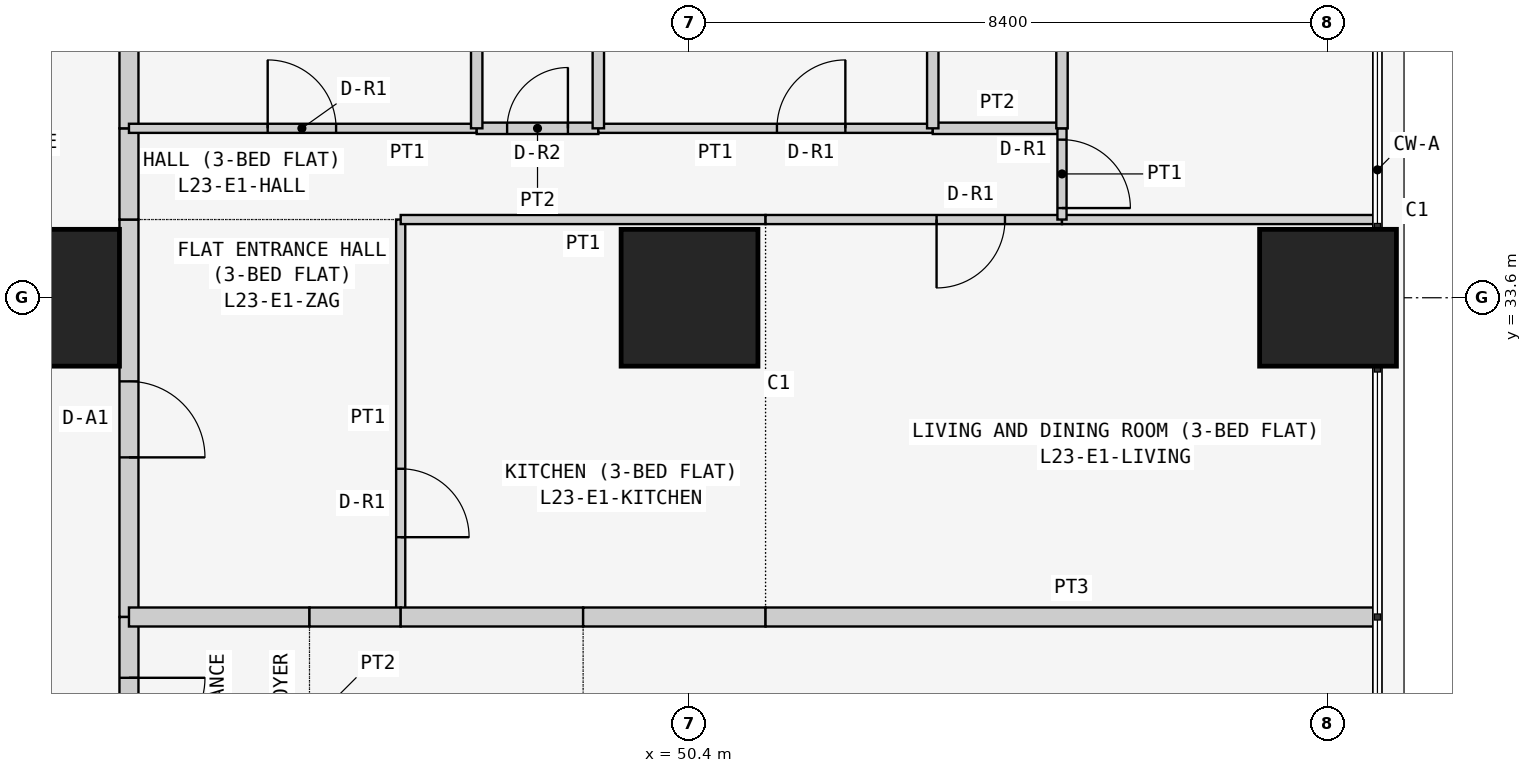
"""IFC4 building model, lengths in metres.
Left out: names, types, materials, properties, quantities, classifications, styles, units other than length and angle.
Written with IfcOpenShell. Run it as: python <this file> out.ifc"""

import sys

from ifc_helpers import new_model, si_unit, direction, frame, frame_2d, origin, origin_2d, place, context, subcontext, project, spatial, rectangle, extrude, element, fill, save


model = new_model("IFC4")
c1 = context("Model", 3, precision=1e-05, world=origin(), true_north=direction((0.0, 1.0)))
c2 = subcontext(c1, "Body", "Model", "MODEL_VIEW")
j1 = project(units=[si_unit("LENGTHUNIT", "METRE"), si_unit("PLANEANGLEUNIT", "RADIAN")], contexts=[c1])
p1 = place(None, origin())
s1 = spatial("IfcSite", under=j1, at=p1, CompositionType="ELEMENT")
p2 = place(p1, origin())
s2 = spatial("IfcBuilding", under=s1, at=p2, CompositionType="ELEMENT")
p3 = place(p2, frame((0.0, 0.0, 92.1)))
s3 = spatial("IfcBuildingStorey", under=s2, at=p3, CompositionType="ELEMENT", Elevation=92.1)
for number, where, z_axis, x_axis in (
    (1, (42.0, 33.6, 0.0), (0.0, 0.0, 1.0), (1.0, 0.0, 0.0)),
    (2, (50.4, 33.6, 0.0), (0.0, 0.0, 1.0), (1.0, 0.0, 0.0)),
    (3, (58.8, 33.6, 0.0), (0.0, 0.0, 1.0), (1.0, 0.0, 0.0)),
):
    element("IfcColumn", number, at=place(p3, frame(where, z_axis=z_axis, x_axis=x_axis)), inside=s3, PredefinedType="COLUMN", context=c2, shape_type="SweptSolid", body=[
        extrude(rectangle(XDim=1.8, YDim=1.8, at=origin_2d()), origin(), (0.0, 0.0, 1.0), 3.6),
    ])
p4 = place(p3, frame((43.025, 34.629, 0.0), z_axis=(0.0, 0.0, 1.0), x_axis=(0.0, -1.0, 0.0)))
e4 = element("IfcWall", 4, at=p4, inside=s3, PredefinedType="PARTITIONING", context=c2, shape_type="SweptSolid", body=[
    extrude(rectangle(XDim=5.229, YDim=0.25, at=frame_2d((2.615, 0.0))), origin(), (0.0, 0.0, 1.0), 3.45),
])
p5 = place(p4, frame((2.129, 0.0, 0.0)))
e5 = element("IfcOpeningElement", 5, at=p5, cuts=e4, PredefinedType="OPENING", context=c2, shape_type="SweptSolid", body=[
    extrude(rectangle(XDim=1.0, YDim=2.1, at=frame_2d((0.5, 1.05))), frame((0.0, 0.135, 0.0), z_axis=(0.0, -1.0, 0.0), x_axis=(1.0, 0.0, 0.0)), (0.0, 0.0, 1.0), 0.27),
])
p6 = place(p3, frame((43.025, 35.829, 0.0), z_axis=(0.0, 0.0, 1.0), x_axis=(0.0, -1.0, 0.0)))
e6 = element("IfcWall", 6, at=p6, inside=s3, PredefinedType="PARTITIONING", context=c2, shape_type="SweptSolid", body=[
    extrude(rectangle(XDim=1.2, YDim=0.25, at=frame_2d((0.6, 0.0))), origin(), (0.0, 0.0, 1.0), 3.45),
])
p7 = place(p3, frame((43.025, 42.7, 0.0), z_axis=(0.0, 0.0, 1.0), x_axis=(0.0, -1.0, 0.0)))
e7 = element("IfcWall", 7, at=p7, inside=s3, PredefinedType="PARTITIONING", context=c2, shape_type="SweptSolid", body=[
    extrude(rectangle(XDim=6.871, YDim=0.25, at=frame_2d((3.436, 0.0))), origin(), (0.0, 0.0, 1.0), 3.45),
])
p8 = place(p3, frame((43.025, 29.4, 0.0), z_axis=(0.0, 0.0, 1.0), x_axis=(0.0, -1.0, 0.0)))
e8 = element("IfcWall", 8, at=p8, inside=s3, PredefinedType="PARTITIONING", context=c2, shape_type="SweptSolid", body=[
    extrude(rectangle(XDim=2.6, YDim=0.25, at=frame_2d((1.3, 0.0))), origin(), (0.0, 0.0, 1.0), 3.45),
])
p9 = place(p8, frame((0.8, 0.0, 0.0)))
e9 = element("IfcOpeningElement", 9, at=p9, cuts=e8, PredefinedType="OPENING", context=c2, shape_type="SweptSolid", body=[
    extrude(rectangle(XDim=1.0, YDim=2.1, at=frame_2d((0.5, 1.05))), frame((0.0, 0.135, 0.0), z_axis=(0.0, -1.0, 0.0), x_axis=(1.0, 0.0, 0.0)), (0.0, 0.0, 1.0), 0.27),
])
p10 = place(p3, frame((46.6, 29.4, 0.0), z_axis=(0.0, 0.0, 1.0), x_axis=(0.0, 1.0, 0.0)))
e10 = element("IfcWall", 10, at=p10, inside=s3, PredefinedType="PARTITIONING", context=c2, shape_type="SweptSolid", body=[
    extrude(rectangle(XDim=5.229, YDim=0.12, at=frame_2d((2.615, 0.0))), origin(), (0.0, 0.0, 1.0), 3.45),
])
p11 = place(p10, frame((1.05, 0.0, 0.0)))
e11 = element("IfcOpeningElement", 11, at=p11, cuts=e10, PredefinedType="OPENING", context=c2, shape_type="SweptSolid", body=[
    extrude(rectangle(XDim=0.9, YDim=2.1, at=frame_2d((0.45, 1.05))), frame((0.0, 0.07, 0.0), z_axis=(0.0, -1.0, 0.0), x_axis=(1.0, 0.0, 0.0)), (0.0, 0.0, 1.0), 0.14),
])
p12 = place(p3, frame((43.025, 29.4, 0.0), z_axis=(0.0, 0.0, 1.0), x_axis=(1.0, 0.0, 0.0)))
e12 = element("IfcWall", 12, at=p12, inside=s3, PredefinedType="PARTITIONING", context=c2, shape_type="SweptSolid", body=[
    extrude(rectangle(XDim=2.375, YDim=0.25, at=frame_2d((1.188, 0.0))), origin(), (0.0, 0.0, 1.0), 3.45),
])
p13 = place(p3, frame((45.4, 29.4, 0.0), z_axis=(0.0, 0.0, 1.0), x_axis=(1.0, 0.0, 0.0)))
e13 = element("IfcWall", 13, at=p13, inside=s3, PredefinedType="PARTITIONING", context=c2, shape_type="SweptSolid", body=[
    extrude(rectangle(XDim=1.2, YDim=0.25, at=frame_2d((0.6, 0.0))), origin(), (0.0, 0.0, 1.0), 3.45),
])
p14 = place(p3, frame((51.4, 34.629, 0.0), z_axis=(0.0, 0.0, 1.0), x_axis=(-1.0, 0.0, 0.0)))
e14 = element("IfcWall", 14, at=p14, inside=s3, PredefinedType="PARTITIONING", context=c2, shape_type="SweptSolid", body=[
    extrude(rectangle(XDim=4.8, YDim=0.12, at=frame_2d((2.4, 0.0))), origin(), (0.0, 0.0, 1.0), 3.45),
])
for number, where, z_axis, x_axis in (
    (15, (46.6, 29.4, 0.0), (0.0, 0.0, 1.0), (1.0, 0.0, 0.0)),
    (16, (49.0, 29.4, 0.0), (0.0, 0.0, 1.0), (1.0, 0.0, 0.0)),
):
    element("IfcWall", number, at=place(p3, frame(where, z_axis=z_axis, x_axis=x_axis)), inside=s3, PredefinedType="PARTITIONING", context=c2, shape_type="SweptSolid", body=[
        extrude(rectangle(XDim=2.4, YDim=0.25, at=frame_2d((1.2, 0.0))), origin(), (0.0, 0.0, 1.0), 3.45),
    ])
p15 = place(p3, frame((55.3, 34.629, 0.0), z_axis=(0.0, 0.0, 1.0), x_axis=(-1.0, 0.0, 0.0)))
e17 = element("IfcWall", 17, at=p15, inside=s3, PredefinedType="PARTITIONING", context=c2, shape_type="SweptSolid", body=[
    extrude(rectangle(XDim=3.9, YDim=0.12, at=frame_2d((1.95, 0.0))), origin(), (0.0, 0.0, 1.0), 3.45),
])
p16 = place(p15, frame((0.75, 0.0, 0.0)))
e18 = element("IfcOpeningElement", 18, at=p16, cuts=e17, PredefinedType="OPENING", context=c2, shape_type="SweptSolid", body=[
    extrude(rectangle(XDim=0.9, YDim=2.1, at=frame_2d((0.45, 1.05))), frame((0.0, 0.07, 0.0), z_axis=(0.0, -1.0, 0.0), x_axis=(1.0, 0.0, 0.0)), (0.0, 0.0, 1.0), 0.14),
])
p17 = place(p3, frame((59.45, 34.629, 0.0), z_axis=(0.0, 0.0, 1.0), x_axis=(-1.0, 0.0, 0.0)))
e19 = element("IfcWall", 19, at=p17, inside=s3, PredefinedType="PARTITIONING", context=c2, shape_type="SweptSolid", body=[
    extrude(rectangle(XDim=4.15, YDim=0.12, at=frame_2d((2.075, 0.0))), origin(), (0.0, 0.0, 1.0), 3.45),
])
p18 = place(p3, frame((51.4, 29.4, 0.0), z_axis=(0.0, 0.0, 1.0), x_axis=(1.0, 0.0, 0.0)))
e20 = element("IfcWall", 20, at=p18, inside=s3, PredefinedType="PARTITIONING", context=c2, shape_type="SweptSolid", body=[
    extrude(rectangle(XDim=8.05, YDim=0.25, at=frame_2d((4.025, 0.0))), origin(), (0.0, 0.0, 1.0), 3.45),
])
p19 = place(p3, frame((47.6, 35.829, 0.0), z_axis=(0.0, 0.0, 1.0), x_axis=(-1.0, 0.0, 0.0)))
e21 = element("IfcWall", 21, at=p19, inside=s3, PredefinedType="PARTITIONING", context=c2, shape_type="SweptSolid", body=[
    extrude(rectangle(XDim=4.575, YDim=0.12, at=frame_2d((2.288, 0.0))), origin(), (0.0, 0.0, 1.0), 3.45),
])
p20 = place(p19, frame((1.85, 0.0, 0.0)))
e22 = element("IfcOpeningElement", 22, at=p20, cuts=e21, PredefinedType="OPENING", context=c2, shape_type="SweptSolid", body=[
    extrude(rectangle(XDim=0.9, YDim=2.1, at=frame_2d((0.45, 1.05))), frame((0.0, 0.07, 0.0), z_axis=(0.0, -1.0, 0.0), x_axis=(1.0, 0.0, 0.0)), (0.0, 0.0, 1.0), 0.14),
])
p21 = place(p3, frame((49.2, 35.829, 0.0), z_axis=(0.0, 0.0, 1.0), x_axis=(-1.0, 0.0, 0.0)))
e23 = element("IfcWall", 23, at=p21, inside=s3, PredefinedType="PARTITIONING", context=c2, shape_type="SweptSolid", body=[
    extrude(rectangle(XDim=1.6, YDim=0.15, at=frame_2d((0.8, 0.0))), origin(), (0.0, 0.0, 1.0), 3.45),
])
p22 = place(p21, frame((0.4, 0.0, 0.0)))
e24 = element("IfcOpeningElement", 24, at=p22, cuts=e23, PredefinedType="OPENING", context=c2, shape_type="SweptSolid", body=[
    extrude(rectangle(XDim=0.8, YDim=2.1, at=frame_2d((0.4, 1.05))), frame((0.0, 0.085, 0.0), z_axis=(0.0, -1.0, 0.0), x_axis=(1.0, 0.0, 0.0)), (0.0, 0.0, 1.0), 0.17),
])
p23 = place(p3, frame((53.6, 35.829, 0.0), z_axis=(0.0, 0.0, 1.0), x_axis=(-1.0, 0.0, 0.0)))
e25 = element("IfcWall", 25, at=p23, inside=s3, PredefinedType="PARTITIONING", context=c2, shape_type="SweptSolid", body=[
    extrude(rectangle(XDim=4.4, YDim=0.12, at=frame_2d((2.2, 0.0))), origin(), (0.0, 0.0, 1.0), 3.45),
])
p24 = place(p23, frame((1.15, 0.0, 0.0)))
e26 = element("IfcOpeningElement", 26, at=p24, cuts=e25, PredefinedType="OPENING", context=c2, shape_type="SweptSolid", body=[
    extrude(rectangle(XDim=0.9, YDim=2.1, at=frame_2d((0.45, 1.05))), frame((0.0, 0.07, 0.0), z_axis=(0.0, -1.0, 0.0), x_axis=(1.0, 0.0, 0.0)), (0.0, 0.0, 1.0), 0.14),
])
p25 = place(p3, frame((55.3, 35.829, 0.0), z_axis=(0.0, 0.0, 1.0), x_axis=(-1.0, 0.0, 0.0)))
e27 = element("IfcWall", 27, at=p25, inside=s3, PredefinedType="PARTITIONING", context=c2, shape_type="SweptSolid", body=[
    extrude(rectangle(XDim=1.7, YDim=0.15, at=frame_2d((0.85, 0.0))), origin(), (0.0, 0.0, 1.0), 3.45),
])
p26 = place(p3, frame((55.3, 34.629, 0.0), z_axis=(0.0, 0.0, 1.0), x_axis=(0.0, 1.0, 0.0)))
e28 = element("IfcWall", 28, at=p26, inside=s3, PredefinedType="PARTITIONING", context=c2, shape_type="SweptSolid", body=[
    extrude(rectangle(XDim=1.2, YDim=0.12, at=frame_2d((0.6, 0.0))), origin(), (0.0, 0.0, 1.0), 3.45),
])
p27 = place(p26, frame((0.151, 0.0, 0.0)))
e29 = element("IfcOpeningElement", 29, at=p27, cuts=e28, PredefinedType="OPENING", context=c2, shape_type="SweptSolid", body=[
    extrude(rectangle(XDim=0.9, YDim=2.1, at=frame_2d((0.45, 1.05))), frame((0.0, 0.07, 0.0), z_axis=(0.0, -1.0, 0.0), x_axis=(1.0, 0.0, 0.0)), (0.0, 0.0, 1.0), 0.14),
])
for number, where, z_axis, x_axis in (
    (30, (47.6, 35.829, 0.0), (0.0, 0.0, 1.0), (0.0, 1.0, 0.0)),
    (31, (49.2, 35.829, 0.0), (0.0, 0.0, 1.0), (0.0, 1.0, 0.0)),
    (32, (53.6, 35.829, 0.0), (0.0, 0.0, 1.0), (0.0, 1.0, 0.0)),
):
    element("IfcWall", number, at=place(p3, frame(where, z_axis=z_axis, x_axis=x_axis)), inside=s3, PredefinedType="PARTITIONING", context=c2, shape_type="SweptSolid", body=[
        extrude(rectangle(XDim=6.871, YDim=0.15, at=frame_2d((3.436, 0.0))), origin(), (0.0, 0.0, 1.0), 3.45),
    ])
p28 = place(p3, frame((55.3, 35.829, 0.0), z_axis=(0.0, 0.0, 1.0), x_axis=(0.0, 1.0, 0.0)))
e33 = element("IfcWall", 33, at=p28, inside=s3, PredefinedType="PARTITIONING", context=c2, shape_type="SweptSolid", body=[
    extrude(rectangle(XDim=6.871, YDim=0.15, at=frame_2d((3.436, 0.0))), origin(), (0.0, 0.0, 1.0), 3.45),
])
p29 = place(p28, frame((3.171, 0.0, 0.0)))
e34 = element("IfcOpeningElement", 34, at=p29, cuts=e33, PredefinedType="OPENING", context=c2, shape_type="SweptSolid", body=[
    extrude(rectangle(XDim=0.8, YDim=2.1, at=frame_2d((0.4, 1.05))), frame((0.0, 0.085, 0.0), z_axis=(0.0, -1.0, 0.0), x_axis=(1.0, 0.0, 0.0)), (0.0, 0.0, 1.0), 0.17),
])
p30 = place(p5, origin())
e35 = element("IfcDoor", 35, at=p30, inside=s3, OperationType="SINGLE_SWING_RIGHT", PredefinedType="DOOR", context=c2, shape_type="SweptSolid", body=[
    extrude(rectangle(XDim=1.0, YDim=2.1, at=frame_2d((0.5, 1.05))), frame((0.0, 0.025, 0.0), z_axis=(0.0, -1.0, 0.0), x_axis=(1.0, 0.0, 0.0)), (0.0, 0.0, 1.0), 0.05),
])
fill(e5, e35)
p31 = place(p11, frame((0.9, 0.0, 0.0), z_axis=(0.0, 0.0, 1.0), x_axis=(-1.0, 0.0, 0.0)))
e36 = element("IfcDoor", 36, at=p31, inside=s3, OperationType="SINGLE_SWING_RIGHT", PredefinedType="DOOR", context=c2, shape_type="SweptSolid", body=[
    extrude(rectangle(XDim=0.9, YDim=2.1, at=frame_2d((0.45, 1.05))), frame((0.0, 0.025, 0.0), z_axis=(0.0, -1.0, 0.0), x_axis=(1.0, 0.0, 0.0)), (0.0, 0.0, 1.0), 0.05),
])
fill(e11, e36)
p32 = place(p16, origin())
e37 = element("IfcDoor", 37, at=p32, inside=s3, OperationType="SINGLE_SWING_RIGHT", PredefinedType="DOOR", context=c2, shape_type="SweptSolid", body=[
    extrude(rectangle(XDim=0.9, YDim=2.1, at=frame_2d((0.45, 1.05))), frame((0.0, 0.025, 0.0), z_axis=(0.0, -1.0, 0.0), x_axis=(1.0, 0.0, 0.0)), (0.0, 0.0, 1.0), 0.05),
])
fill(e18, e37)
p33 = place(p20, frame((0.9, 0.0, 0.0), z_axis=(0.0, 0.0, 1.0), x_axis=(-1.0, 0.0, 0.0)))
e38 = element("IfcDoor", 38, at=p33, inside=s3, OperationType="SINGLE_SWING_LEFT", PredefinedType="DOOR", context=c2, shape_type="SweptSolid", body=[
    extrude(rectangle(XDim=0.9, YDim=2.1, at=frame_2d((0.45, 1.05))), frame((0.0, 0.025, 0.0), z_axis=(0.0, -1.0, 0.0), x_axis=(1.0, 0.0, 0.0)), (0.0, 0.0, 1.0), 0.05),
])
fill(e22, e38)
p34 = place(p22, frame((0.8, 0.0, 0.0), z_axis=(0.0, 0.0, 1.0), x_axis=(-1.0, 0.0, 0.0)))
e39 = element("IfcDoor", 39, at=p34, inside=s3, OperationType="SINGLE_SWING_RIGHT", PredefinedType="DOOR", context=c2, shape_type="SweptSolid", body=[
    extrude(rectangle(XDim=0.8, YDim=2.1, at=frame_2d((0.4, 1.05))), frame((0.0, 0.025, 0.0), z_axis=(0.0, -1.0, 0.0), x_axis=(1.0, 0.0, 0.0)), (0.0, 0.0, 1.0), 0.05),
])
fill(e24, e39)
p35 = place(p24, frame((0.9, 0.0, 0.0), z_axis=(0.0, 0.0, 1.0), x_axis=(-1.0, 0.0, 0.0)))
e40 = element("IfcDoor", 40, at=p35, inside=s3, OperationType="SINGLE_SWING_RIGHT", PredefinedType="DOOR", context=c2, shape_type="SweptSolid", body=[
    extrude(rectangle(XDim=0.9, YDim=2.1, at=frame_2d((0.45, 1.05))), frame((0.0, 0.025, 0.0), z_axis=(0.0, -1.0, 0.0), x_axis=(1.0, 0.0, 0.0)), (0.0, 0.0, 1.0), 0.05),
])
fill(e26, e40)
p36 = place(p27, frame((0.9, 0.0, 0.0), z_axis=(0.0, 0.0, 1.0), x_axis=(-1.0, 0.0, 0.0)))
e41 = element("IfcDoor", 41, at=p36, inside=s3, OperationType="SINGLE_SWING_RIGHT", PredefinedType="DOOR", context=c2, shape_type="SweptSolid", body=[
    extrude(rectangle(XDim=0.9, YDim=2.1, at=frame_2d((0.45, 1.05))), frame((0.0, 0.025, 0.0), z_axis=(0.0, -1.0, 0.0), x_axis=(1.0, 0.0, 0.0)), (0.0, 0.0, 1.0), 0.05),
])
fill(e29, e41)
p37 = place(p9, origin())
e42 = element("IfcDoor", 42, at=p37, inside=s3, OperationType="SINGLE_SWING_LEFT", PredefinedType="DOOR", context=c2, shape_type="SweptSolid", body=[
    extrude(rectangle(XDim=1.0, YDim=2.1, at=frame_2d((0.5, 1.05))), frame((0.0, 0.025, 0.0), z_axis=(0.0, -1.0, 0.0), x_axis=(1.0, 0.0, 0.0)), (0.0, 0.0, 1.0), 0.05),
])
fill(e9, e42)
save(model, sys.argv[1])
